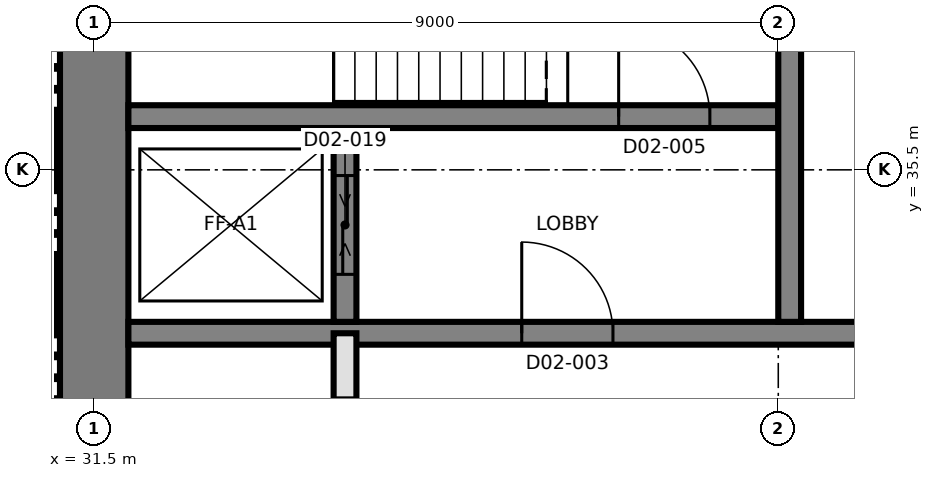
"""IFC4 building model, lengths in metres.
Left out: names, types, materials, properties, quantities, classifications, styles, units other than length and angle.
Written with IfcOpenShell. Run it as: python <this file> out.ifc"""

import sys

from ifc_helpers import new_model, si_unit, direction, frame, frame_2d, origin, place, context, subcontext, project, spatial, rectangle, extrude, element, fill, save


model = new_model("IFC4")
c1 = context("Model", 3, precision=1e-05, world=origin(), true_north=direction((0.0, 1.0)))
c2 = subcontext(c1, "Body", "Model", "MODEL_VIEW")
j1 = project(units=[si_unit("LENGTHUNIT", "METRE"), si_unit("PLANEANGLEUNIT", "RADIAN")], contexts=[c1])
p1 = place(None, origin())
s1 = spatial("IfcSite", under=j1, at=p1, CompositionType="ELEMENT")
p2 = place(p1, origin())
s2 = spatial("IfcBuilding", under=s1, at=p2, CompositionType="ELEMENT")
p3 = place(p2, frame((0.0, 0.0, 44.6)))
s3 = spatial("IfcBuildingStorey", under=s2, at=p3, CompositionType="ELEMENT", Elevation=44.6)
p4 = place(p3, frame((31.5, 21.95, 0.0), z_axis=(0.0, 0.0, 1.0), x_axis=(0.0, 1.0, 0.0)))
e1 = element("IfcWall", 1, at=p4, inside=s3, PredefinedType="SHEAR", context=c2, shape_type="SweptSolid", body=[
    extrude(rectangle(XDim=17.1, YDim=0.9, at=frame_2d((8.55, 0.0))), origin(), (0.0, 0.0, 1.0), 3.7),
])
p5 = place(p3, frame((31.95, 33.35, 0.0), z_axis=(0.0, 0.0, 1.0), x_axis=(1.0, 0.0, 0.0)))
e2 = element("IfcWall", 2, at=p5, inside=s3, PredefinedType="SHEAR", context=c2, shape_type="SweptSolid", body=[
    extrude(rectangle(XDim=26.1, YDim=0.3, at=frame_2d((13.05, 0.0))), origin(), (0.0, 0.0, 1.0), 3.7),
])
p6 = place(p5, frame((13.7, 0.0, 0.0)))
e3 = element("IfcOpeningElement", 3, at=p6, cuts=e2, PredefinedType="OPENING", context=c2, shape_type="SweptSolid", body=[
    extrude(rectangle(XDim=1.4, YDim=2.1, at=frame_2d((0.7, 1.05))), frame((0.0, 0.16, 0.0), z_axis=(0.0, -1.0, 0.0), x_axis=(1.0, 0.0, 0.0)), (0.0, 0.0, 1.0), 0.32),
])
p7 = place(p5, frame((5.175, 0.0, 0.0)))
e4 = element("IfcOpeningElement", 4, at=p7, cuts=e2, PredefinedType="OPENING", context=c2, shape_type="SweptSolid", body=[
    extrude(rectangle(XDim=1.2, YDim=2.1, at=frame_2d((0.6, 1.05))), frame((0.0, 0.16, 0.0), z_axis=(0.0, -1.0, 0.0), x_axis=(1.0, 0.0, 0.0)), (0.0, 0.0, 1.0), 0.32),
])
p8 = place(p5, frame((19.725, 0.0, 0.0)))
e5 = element("IfcOpeningElement", 5, at=p8, cuts=e2, PredefinedType="OPENING", context=c2, shape_type="SweptSolid", body=[
    extrude(rectangle(XDim=1.2, YDim=2.1, at=frame_2d((0.6, 1.05))), frame((0.0, 0.16, 0.0), z_axis=(0.0, -1.0, 0.0), x_axis=(1.0, 0.0, 0.0)), (0.0, 0.0, 1.0), 0.32),
])
p9 = place(p3, frame((31.95, 36.2, 0.0), z_axis=(0.0, 0.0, 1.0), x_axis=(1.0, 0.0, 0.0)))
e6 = element("IfcWall", 6, at=p9, inside=s3, PredefinedType="SHEAR", context=c2, shape_type="SweptSolid", body=[
    extrude(rectangle(XDim=8.55, YDim=0.3, at=frame_2d((4.275, 0.0))), origin(), (0.0, 0.0, 1.0), 3.7),
])
p10 = place(p9, frame((6.45, 0.0, 0.0)))
e7 = element("IfcOpeningElement", 7, at=p10, cuts=e6, PredefinedType="OPENING", context=c2, shape_type="SweptSolid", body=[
    extrude(rectangle(XDim=1.2, YDim=2.1, at=frame_2d((0.6, 1.05))), frame((0.0, 0.16, 0.0), z_axis=(0.0, -1.0, 0.0), x_axis=(1.0, 0.0, 0.0)), (0.0, 0.0, 1.0), 0.32),
])
p11 = place(p3, frame((40.65, 33.5, 0.0), z_axis=(0.0, 0.0, 1.0), x_axis=(0.0, 1.0, 0.0)))
e8 = element("IfcWall", 8, at=p11, inside=s3, PredefinedType="SHEAR", context=c2, shape_type="SweptSolid", body=[
    extrude(rectangle(XDim=5.55, YDim=0.3, at=frame_2d((2.775, 0.0))), origin(), (0.0, 0.0, 1.0), 3.7),
])
p12 = place(p3, frame((34.8, 33.5, 0.0), z_axis=(0.0, 0.0, 1.0), x_axis=(0.0, 1.0, 0.0)))
e9 = element("IfcWall", 9, at=p12, inside=s3, PredefinedType="SHEAR", context=c2, shape_type="SweptSolid", body=[
    extrude(rectangle(XDim=2.55, YDim=0.3, at=frame_2d((1.275, 0.0))), origin(), (0.0, 0.0, 1.0), 3.7),
])
p13 = place(p12, frame((0.625, 0.0, 0.0)))
e10 = element("IfcOpeningElement", 10, at=p13, cuts=e9, PredefinedType="OPENING", context=c2, shape_type="SweptSolid", body=[
    extrude(rectangle(XDim=1.3, YDim=2.4, at=frame_2d((0.65, 1.2))), frame((0.0, 0.16, 0.0), z_axis=(0.0, -1.0, 0.0), x_axis=(1.0, 0.0, 0.0)), (0.0, 0.0, 1.0), 0.32),
])
p14 = place(p3, frame((34.8, 27.9, 0.0), z_axis=(0.0, 0.0, 1.0), x_axis=(0.0, 1.0, 0.0)))
e11 = element("IfcWall", 11, at=p14, inside=s3, PredefinedType="SOLIDWALL", context=c2, shape_type="SweptSolid", body=[
    extrude(rectangle(XDim=5.45, YDim=0.3, at=frame_2d((2.725, 0.0))), origin(), (0.0, 0.0, 1.0), 3.4),
])
p15 = place(p14, frame((3.6, 0.0, 0.0)))
e12 = element("IfcOpeningElement", 12, at=p15, cuts=e11, PredefinedType="OPENING", context=c2, shape_type="SweptSolid", body=[
    extrude(rectangle(XDim=1.0, YDim=2.1, at=frame_2d((0.5, 1.05))), frame((0.0, 0.16, 0.0), z_axis=(0.0, -1.0, 0.0), x_axis=(1.0, 0.0, 0.0)), (0.0, 0.0, 1.0), 0.32),
])
p16 = place(p7, origin())
e13 = element("IfcDoor", 13, at=p16, inside=s3, OperationType="SINGLE_SWING_LEFT", PredefinedType="DOOR", context=c2, shape_type="SweptSolid", body=[
    extrude(rectangle(XDim=1.2, YDim=2.1, at=frame_2d((0.6, 1.05))), frame((0.0, 0.025, 0.0), z_axis=(0.0, -1.0, 0.0), x_axis=(1.0, 0.0, 0.0)), (0.0, 0.0, 1.0), 0.05),
])
fill(e4, e13)
p17 = place(p10, origin())
e14 = element("IfcDoor", 14, at=p17, inside=s3, OperationType="SINGLE_SWING_RIGHT", PredefinedType="DOOR", context=c2, shape_type="SweptSolid", body=[
    extrude(rectangle(XDim=1.2, YDim=2.1, at=frame_2d((0.6, 1.05))), frame((0.0, 0.025, 0.0), z_axis=(0.0, -1.0, 0.0), x_axis=(1.0, 0.0, 0.0)), (0.0, 0.0, 1.0), 0.05),
])
fill(e7, e14)
p18 = place(p13, origin())
e15 = element("IfcDoor", 15, at=p18, inside=s3, OperationType="SLIDING_TO_LEFT", PredefinedType="DOOR", context=c2, shape_type="SweptSolid", body=[
    extrude(rectangle(XDim=1.3, YDim=2.4, at=frame_2d((0.65, 1.2))), frame((0.0, 0.025, 0.0), z_axis=(0.0, -1.0, 0.0), x_axis=(1.0, 0.0, 0.0)), (0.0, 0.0, 1.0), 0.05),
])
fill(e10, e15)
save(model, sys.argv[1])
